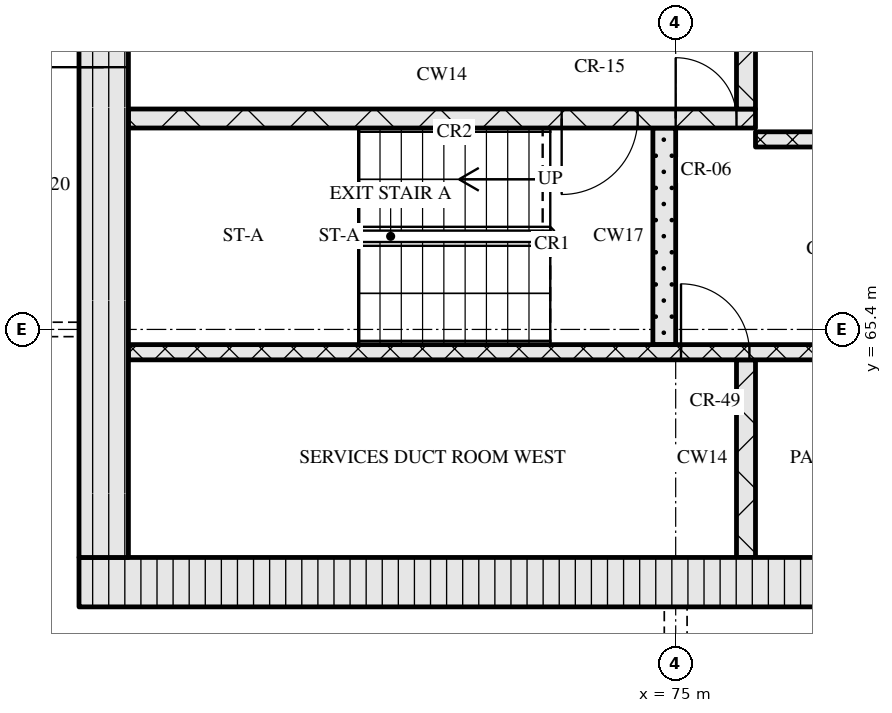
"""IFC4 building model, lengths in metres.
Left out: names, types, materials, properties, quantities, classifications, styles, units other than length and angle.
Written with IfcOpenShell. Run it as: python <this file> out.ifc"""

import sys

from ifc_helpers import new_model, si_unit, direction, frame, frame_2d, origin, place, context, subcontext, project, spatial, rectangle, extrude, element, fill, save


model = new_model("IFC4")
c1 = context("Model", 3, precision=1e-05, world=origin(), true_north=direction((0.0, 1.0)))
c2 = subcontext(c1, "Body", "Model", "MODEL_VIEW")
j1 = project(units=[si_unit("LENGTHUNIT", "METRE"), si_unit("PLANEANGLEUNIT", "RADIAN")], contexts=[c1])
p1 = place(None, origin())
s1 = spatial("IfcSite", under=j1, at=p1, CompositionType="ELEMENT")
p2 = place(p1, origin())
s2 = spatial("IfcBuilding", under=s1, at=p2, CompositionType="ELEMENT")
p3 = place(p2, frame((0.0, 0.0, 227.1)))
s3 = spatial("IfcBuildingStorey", under=s2, at=p3, CompositionType="ELEMENT", Elevation=227.1)
p4 = place(p3, frame((67.15, 62.075, 0.0), z_axis=(0.0, 0.0, 1.0), x_axis=(1.0, 0.0, 0.0)))
e1 = element("IfcWall", 1, at=p4, inside=s3, PredefinedType="SOLIDWALL", context=c2, shape_type="SweptSolid", body=[
    extrude(rectangle(XDim=40.9, YDim=0.65, at=frame_2d((20.45, 0.0))), origin(), (0.0, 0.0, 1.0), 3.32),
])
p5 = place(p4, frame((20.8, 0.0, 0.0)))
e2 = element("IfcOpeningElement", 2, at=p5, cuts=e1, PredefinedType="OPENING", context=c2, shape_type="SweptSolid", body=[
    extrude(rectangle(XDim=1.8, YDim=2.1, at=frame_2d((0.9, 1.05))), frame((0.0, 0.335, 0.0), z_axis=(0.0, -1.0, 0.0), x_axis=(1.0, 0.0, 0.0)), (0.0, 0.0, 1.0), 0.67),
])
p6 = place(p3, frame((67.475, 62.4, 0.0), z_axis=(0.0, 0.0, 1.0), x_axis=(0.0, 1.0, 0.0)))
e3 = element("IfcWall", 3, at=p6, inside=s3, PredefinedType="SOLIDWALL", context=c2, shape_type="SweptSolid", body=[
    extrude(rectangle(XDim=12.0, YDim=0.65, at=frame_2d((6.0, 0.0))), origin(), (0.0, 0.0, 1.0), 3.32),
])
p7 = place(p6, frame((6.45, 0.0, 0.0)))
e4 = element("IfcOpeningElement", 4, at=p7, cuts=e3, PredefinedType="OPENING", context=c2, shape_type="SweptSolid", body=[
    extrude(rectangle(XDim=1.2, YDim=2.1, at=frame_2d((0.6, 1.05))), frame((0.0, 0.335, 0.0), z_axis=(0.0, -1.0, 0.0), x_axis=(1.0, 0.0, 0.0)), (0.0, 0.0, 1.0), 0.67),
])
p8 = place(p3, frame((75.925, 62.4, 0.0), z_axis=(0.0, 0.0, 1.0), x_axis=(0.0, 1.0, 0.0)))
e5 = element("IfcWall", 5, at=p8, inside=s3, PredefinedType="SOLIDWALL", context=c2, shape_type="SweptSolid", body=[
    extrude(rectangle(XDim=2.6, YDim=0.25, at=frame_2d((1.3, 0.0))), origin(), (0.0, 0.0, 1.0), 3.32),
])
p9 = place(p3, frame((67.8, 65.1, 0.0), z_axis=(0.0, 0.0, 1.0), x_axis=(1.0, 0.0, 0.0)))
e6 = element("IfcWall", 6, at=p9, inside=s3, PredefinedType="SOLIDWALL", context=c2, shape_type="SweptSolid", body=[
    extrude(rectangle(XDim=18.5, YDim=0.2, at=frame_2d((9.25, 0.0))), origin(), (0.0, 0.0, 1.0), 3.32),
])
p10 = place(p9, frame((7.27, 0.0, 0.0)))
e7 = element("IfcOpeningElement", 7, at=p10, cuts=e6, PredefinedType="OPENING", context=c2, shape_type="SweptSolid", body=[
    extrude(rectangle(XDim=0.9, YDim=2.1, at=frame_2d((0.45, 1.05))), frame((0.0, 0.11, 0.0), z_axis=(0.0, -1.0, 0.0), x_axis=(1.0, 0.0, 0.0)), (0.0, 0.0, 1.0), 0.22),
])
p11 = place(p9, frame((9.05, 0.0, 0.0)))
e8 = element("IfcOpeningElement", 8, at=p11, cuts=e6, PredefinedType="OPENING", context=c2, shape_type="SweptSolid", body=[
    extrude(rectangle(XDim=0.9, YDim=2.1, at=frame_2d((0.45, 1.05))), frame((0.0, 0.11, 0.0), z_axis=(0.0, -1.0, 0.0), x_axis=(1.0, 0.0, 0.0)), (0.0, 0.0, 1.0), 0.22),
])
p12 = place(p9, frame((12.76, 0.0, 0.0)))
e9 = element("IfcOpeningElement", 9, at=p12, cuts=e6, PredefinedType="OPENING", context=c2, shape_type="SweptSolid", body=[
    extrude(rectangle(XDim=0.9, YDim=2.1, at=frame_2d((0.45, 1.05))), frame((0.0, 0.11, 0.0), z_axis=(0.0, -1.0, 0.0), x_axis=(1.0, 0.0, 0.0)), (0.0, 0.0, 1.0), 0.22),
])
p13 = place(p9, frame((16.7, 0.0, 0.0)))
e10 = element("IfcOpeningElement", 10, at=p13, cuts=e6, PredefinedType="OPENING", context=c2, shape_type="SweptSolid", body=[
    extrude(rectangle(XDim=0.9, YDim=2.1, at=frame_2d((0.45, 1.05))), frame((0.0, 0.11, 0.0), z_axis=(0.0, -1.0, 0.0), x_axis=(1.0, 0.0, 0.0)), (0.0, 0.0, 1.0), 0.22),
])
p14 = place(p3, frame((74.85, 65.2, 0.0), z_axis=(0.0, 0.0, 1.0), x_axis=(0.0, 1.0, 0.0)))
e11 = element("IfcWall", 11, at=p14, inside=s3, PredefinedType="SOLIDWALL", context=c2, shape_type="SweptSolid", body=[
    extrude(rectangle(XDim=2.85, YDim=0.3, at=frame_2d((1.425, 0.0))), origin(), (0.0, 0.0, 1.0), 3.32),
])
p15 = place(p3, frame((76.05, 67.9, 0.0), z_axis=(0.0, 0.0, 1.0), x_axis=(1.0, 0.0, 0.0)))
e12 = element("IfcWall", 12, at=p15, inside=s3, PredefinedType="SOLIDWALL", context=c2, shape_type="SweptSolid", body=[
    extrude(rectangle(XDim=23.1, YDim=0.2, at=frame_2d((11.55, 0.0))), origin(), (0.0, 0.0, 1.0), 3.32),
])
p16 = place(p15, frame((1.35, 0.0, 0.0)))
e13 = element("IfcOpeningElement", 13, at=p16, cuts=e12, PredefinedType="OPENING", context=c2, shape_type="SweptSolid", body=[
    extrude(rectangle(XDim=0.9, YDim=2.1, at=frame_2d((0.45, 1.05))), frame((0.0, 0.11, 0.0), z_axis=(0.0, -1.0, 0.0), x_axis=(1.0, 0.0, 0.0)), (0.0, 0.0, 1.0), 0.22),
])
p17 = place(p15, frame((5.06, 0.0, 0.0)))
e14 = element("IfcOpeningElement", 14, at=p17, cuts=e12, PredefinedType="OPENING", context=c2, shape_type="SweptSolid", body=[
    extrude(rectangle(XDim=0.9, YDim=2.1, at=frame_2d((0.45, 1.05))), frame((0.0, 0.11, 0.0), z_axis=(0.0, -1.0, 0.0), x_axis=(1.0, 0.0, 0.0)), (0.0, 0.0, 1.0), 0.22),
])
p18 = place(p15, frame((8.45, 0.0, 0.0)))
e15 = element("IfcOpeningElement", 15, at=p18, cuts=e12, PredefinedType="OPENING", context=c2, shape_type="SweptSolid", body=[
    extrude(rectangle(XDim=0.9, YDim=2.1, at=frame_2d((0.45, 1.05))), frame((0.0, 0.11, 0.0), z_axis=(0.0, -1.0, 0.0), x_axis=(1.0, 0.0, 0.0)), (0.0, 0.0, 1.0), 0.22),
])
p19 = place(p15, frame((10.91, 0.0, 0.0)))
e16 = element("IfcOpeningElement", 16, at=p19, cuts=e12, PredefinedType="OPENING", context=c2, shape_type="SweptSolid", body=[
    extrude(rectangle(XDim=0.9, YDim=2.1, at=frame_2d((0.45, 1.05))), frame((0.0, 0.11, 0.0), z_axis=(0.0, -1.0, 0.0), x_axis=(1.0, 0.0, 0.0)), (0.0, 0.0, 1.0), 0.22),
])
p20 = place(p15, frame((13.55, 0.0, 0.0)))
e17 = element("IfcOpeningElement", 17, at=p20, cuts=e12, PredefinedType="OPENING", context=c2, shape_type="SweptSolid", body=[
    extrude(rectangle(XDim=1.0, YDim=2.1, at=frame_2d((0.5, 1.05))), frame((0.0, 0.11, 0.0), z_axis=(0.0, -1.0, 0.0), x_axis=(1.0, 0.0, 0.0)), (0.0, 0.0, 1.0), 0.22),
])
p21 = place(p15, frame((16.2, 0.0, 0.0)))
e18 = element("IfcOpeningElement", 18, at=p21, cuts=e12, PredefinedType="OPENING", context=c2, shape_type="SweptSolid", body=[
    extrude(rectangle(XDim=1.1, YDim=2.1, at=frame_2d((0.55, 1.05))), frame((0.0, 0.11, 0.0), z_axis=(0.0, -1.0, 0.0), x_axis=(1.0, 0.0, 0.0)), (0.0, 0.0, 1.0), 0.22),
])
p22 = place(p15, frame((18.7, 0.0, 0.0)))
e19 = element("IfcOpeningElement", 19, at=p22, cuts=e12, PredefinedType="OPENING", context=c2, shape_type="SweptSolid", body=[
    extrude(rectangle(XDim=1.1, YDim=2.1, at=frame_2d((0.55, 1.05))), frame((0.0, 0.11, 0.0), z_axis=(0.0, -1.0, 0.0), x_axis=(1.0, 0.0, 0.0)), (0.0, 0.0, 1.0), 0.22),
])
p23 = place(p15, frame((21.2, 0.0, 0.0)))
e20 = element("IfcOpeningElement", 20, at=p23, cuts=e12, PredefinedType="OPENING", context=c2, shape_type="SweptSolid", body=[
    extrude(rectangle(XDim=1.1, YDim=2.1, at=frame_2d((0.55, 1.05))), frame((0.0, 0.11, 0.0), z_axis=(0.0, -1.0, 0.0), x_axis=(1.0, 0.0, 0.0)), (0.0, 0.0, 1.0), 0.22),
])
p24 = place(p3, frame((67.8, 68.175, 0.0), z_axis=(0.0, 0.0, 1.0), x_axis=(1.0, 0.0, 0.0)))
e21 = element("IfcWall", 21, at=p24, inside=s3, PredefinedType="SOLIDWALL", context=c2, shape_type="SweptSolid", body=[
    extrude(rectangle(XDim=8.25, YDim=0.25, at=frame_2d((4.125, 0.0))), origin(), (0.0, 0.0, 1.0), 3.32),
])
p25 = place(p24, frame((5.7, 0.0, 0.0)))
e22 = element("IfcOpeningElement", 22, at=p25, cuts=e21, PredefinedType="OPENING", context=c2, shape_type="SweptSolid", body=[
    extrude(rectangle(XDim=1.0, YDim=2.1, at=frame_2d((0.5, 1.05))), frame((0.0, 0.135, 0.0), z_axis=(0.0, -1.0, 0.0), x_axis=(1.0, 0.0, 0.0)), (0.0, 0.0, 1.0), 0.27),
])
p26 = place(p24, frame((7.2, 0.0, 0.0)))
e23 = element("IfcOpeningElement", 23, at=p26, cuts=e21, PredefinedType="OPENING", context=c2, shape_type="SweptSolid", body=[
    extrude(rectangle(XDim=0.8, YDim=2.1, at=frame_2d((0.4, 1.05))), frame((0.0, 0.135, 0.0), z_axis=(0.0, -1.0, 0.0), x_axis=(1.0, 0.0, 0.0)), (0.0, 0.0, 1.0), 0.27),
])
p27 = place(p3, frame((75.925, 68.3, 0.0), z_axis=(0.0, 0.0, 1.0), x_axis=(0.0, 1.0, 0.0)))
e24 = element("IfcWall", 24, at=p27, inside=s3, PredefinedType="SOLIDWALL", context=c2, shape_type="SweptSolid", body=[
    extrude(rectangle(XDim=2.3, YDim=0.25, at=frame_2d((1.15, 0.0))), origin(), (0.0, 0.0, 1.0), 3.32),
])
p28 = place(p10, origin())
e25 = element("IfcDoor", 25, at=p28, inside=s3, OperationType="SINGLE_SWING_LEFT", PredefinedType="DOOR", context=c2, shape_type="SweptSolid", body=[
    extrude(rectangle(XDim=0.9, YDim=2.1, at=frame_2d((0.45, 1.05))), frame((0.0, 0.025, 0.0), z_axis=(0.0, -1.0, 0.0), x_axis=(1.0, 0.0, 0.0)), (0.0, 0.0, 1.0), 0.05),
])
fill(e7, e25)
p29 = place(p25, origin())
e26 = element("IfcDoor", 26, at=p29, inside=s3, OperationType="SINGLE_SWING_RIGHT", PredefinedType="DOOR", context=c2, shape_type="SweptSolid", body=[
    extrude(rectangle(XDim=1.0, YDim=2.1, at=frame_2d((0.5, 1.05))), frame((0.0, 0.025, 0.0), z_axis=(0.0, -1.0, 0.0), x_axis=(1.0, 0.0, 0.0)), (0.0, 0.0, 1.0), 0.05),
])
fill(e22, e26)
p30 = place(p26, origin())
e27 = element("IfcDoor", 27, at=p30, inside=s3, OperationType="SINGLE_SWING_LEFT", PredefinedType="DOOR", context=c2, shape_type="SweptSolid", body=[
    extrude(rectangle(XDim=0.8, YDim=2.1, at=frame_2d((0.4, 1.05))), frame((0.0, 0.025, 0.0), z_axis=(0.0, -1.0, 0.0), x_axis=(1.0, 0.0, 0.0)), (0.0, 0.0, 1.0), 0.05),
])
fill(e23, e27)
p31 = place(p7, origin())
e28 = element("IfcDoor", 28, at=p31, inside=s3, OperationType="SINGLE_SWING_LEFT", PredefinedType="DOOR", context=c2, shape_type="SweptSolid", body=[
    extrude(rectangle(XDim=1.2, YDim=2.1, at=frame_2d((0.6, 1.05))), frame((0.0, 0.025, 0.0), z_axis=(0.0, -1.0, 0.0), x_axis=(1.0, 0.0, 0.0)), (0.0, 0.0, 1.0), 0.05),
])
fill(e4, e28)
save(model, sys.argv[1])
